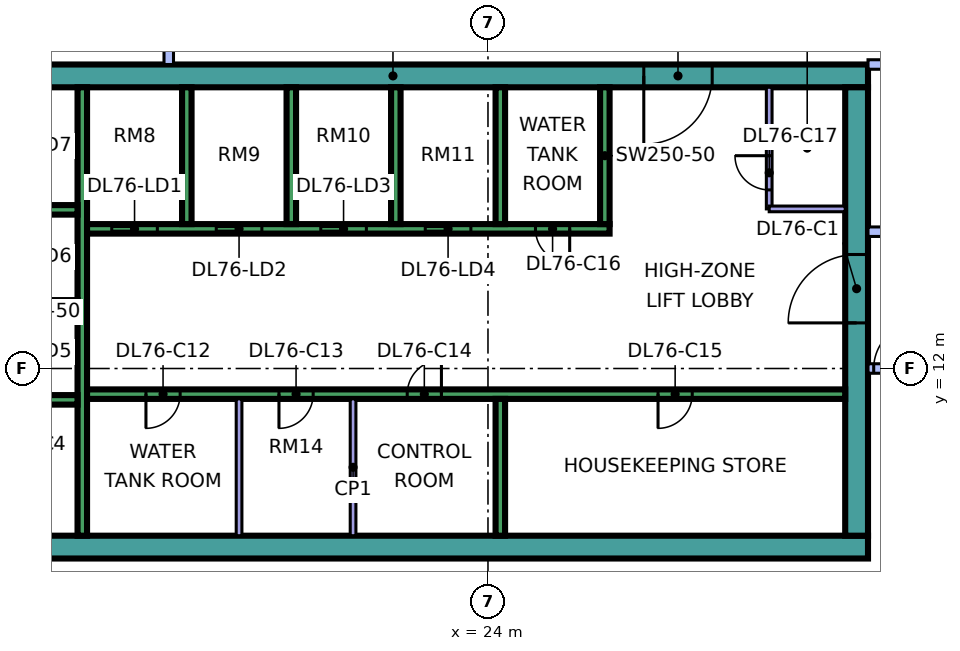
"""IFC4 building model, lengths in metres.
Left out: names, types, materials, properties, quantities, classifications, styles, units other than length and angle.
Written with IfcOpenShell. Run it as: python <this file> out.ifc"""

import sys

from ifc_helpers import new_model, si_unit, direction, frame, frame_2d, origin, place, context, subcontext, project, spatial, rectangle, extrude, element, fill, save


model = new_model("IFC4")
c1 = context("Model", 3, precision=1e-05, world=origin(), true_north=direction((0.0, 1.0)))
c2 = subcontext(c1, "Body", "Model", "MODEL_VIEW")
j1 = project(units=[si_unit("LENGTHUNIT", "METRE"), si_unit("PLANEANGLEUNIT", "RADIAN")], contexts=[c1])
p1 = place(None, origin())
s1 = spatial("IfcSite", under=j1, at=p1, CompositionType="ELEMENT")
p2 = place(p1, origin())
s2 = spatial("IfcBuilding", under=s1, at=p2, CompositionType="ELEMENT")
p3 = place(p2, frame((0.0, 0.0, 322.15)))
s3 = spatial("IfcBuildingStorey", under=s2, at=p3, CompositionType="ELEMENT", Elevation=322.15)
p4 = place(p3, frame((9.0, 7.3, 0.0), z_axis=(0.0, 0.0, 1.0), x_axis=(1.0, 0.0, 0.0)))
e1 = element("IfcWall", 1, at=p4, inside=s3, PredefinedType="SHEAR", context=c2, shape_type="SweptSolid", body=[
    extrude(rectangle(XDim=25.0, YDim=0.6, at=frame_2d((12.5, 0.0))), origin(), (0.0, 0.0, 1.0), 5.5),
])
p5 = place(p3, frame((9.0, 19.7, 0.0), z_axis=(0.0, 0.0, 1.0), x_axis=(1.0, 0.0, 0.0)))
e2 = element("IfcWall", 2, at=p5, inside=s3, PredefinedType="SHEAR", context=c2, shape_type="SweptSolid", body=[
    extrude(rectangle(XDim=25.0, YDim=0.6, at=frame_2d((12.5, 0.0))), origin(), (0.0, 0.0, 1.0), 5.5),
])
p6 = place(p5, frame((19.1, 0.0, 0.0)))
e3 = element("IfcOpeningElement", 3, at=p6, cuts=e2, PredefinedType="OPENING", context=c2, shape_type="SweptSolid", body=[
    extrude(rectangle(XDim=1.8, YDim=2.4, at=frame_2d((0.9, 1.2))), frame((0.0, 0.31, 0.0), z_axis=(0.0, -1.0, 0.0), x_axis=(1.0, 0.0, 0.0)), (0.0, 0.0, 1.0), 0.62),
])
p7 = place(p3, frame((33.7, 7.6, 0.0), z_axis=(0.0, 0.0, 1.0), x_axis=(0.0, 1.0, 0.0)))
e4 = element("IfcWall", 4, at=p7, inside=s3, PredefinedType="SHEAR", context=c2, shape_type="SweptSolid", body=[
    extrude(rectangle(XDim=11.8, YDim=0.6, at=frame_2d((5.9, 0.0))), origin(), (0.0, 0.0, 1.0), 5.5),
])
p8 = place(p7, frame((5.6, 0.0, 0.0)))
e5 = element("IfcOpeningElement", 5, at=p8, cuts=e4, PredefinedType="OPENING", context=c2, shape_type="SweptSolid", body=[
    extrude(rectangle(XDim=1.8, YDim=2.4, at=frame_2d((0.9, 1.2))), frame((0.0, 0.31, 0.0), z_axis=(0.0, -1.0, 0.0), x_axis=(1.0, 0.0, 0.0)), (0.0, 0.0, 1.0), 0.62),
])
p9 = place(p3, frame((13.325, 7.6, 0.0), z_axis=(0.0, 0.0, 1.0), x_axis=(0.0, 1.0, 0.0)))
e6 = element("IfcWall", 6, at=p9, inside=s3, PredefinedType="SHEAR", context=c2, shape_type="SweptSolid", body=[
    extrude(rectangle(XDim=11.8, YDim=0.25, at=frame_2d((5.9, 0.0))), origin(), (0.0, 0.0, 1.0), 5.5),
])
p10 = place(p3, frame((13.45, 11.325, 0.0), z_axis=(0.0, 0.0, 1.0), x_axis=(1.0, 0.0, 0.0)))
e7 = element("IfcWall", 7, at=p10, inside=s3, PredefinedType="SHEAR", context=c2, shape_type="SweptSolid", body=[
    extrude(rectangle(XDim=19.95, YDim=0.25, at=frame_2d((9.975, 0.0))), origin(), (0.0, 0.0, 1.0), 5.5),
])
p11 = place(p10, frame((1.55, 0.0, 0.0)))
e8 = element("IfcOpeningElement", 8, at=p11, cuts=e7, PredefinedType="OPENING", context=c2, shape_type="SweptSolid", body=[
    extrude(rectangle(XDim=0.9, YDim=2.1, at=frame_2d((0.45, 1.05))), frame((0.0, 0.135, 0.0), z_axis=(0.0, -1.0, 0.0), x_axis=(1.0, 0.0, 0.0)), (0.0, 0.0, 1.0), 0.27),
])
p12 = place(p10, frame((5.05, 0.0, 0.0)))
e9 = element("IfcOpeningElement", 9, at=p12, cuts=e7, PredefinedType="OPENING", context=c2, shape_type="SweptSolid", body=[
    extrude(rectangle(XDim=0.9, YDim=2.1, at=frame_2d((0.45, 1.05))), frame((0.0, 0.135, 0.0), z_axis=(0.0, -1.0, 0.0), x_axis=(1.0, 0.0, 0.0)), (0.0, 0.0, 1.0), 0.27),
])
p13 = place(p10, frame((8.425, 0.0, 0.0)))
e10 = element("IfcOpeningElement", 10, at=p13, cuts=e7, PredefinedType="OPENING", context=c2, shape_type="SweptSolid", body=[
    extrude(rectangle(XDim=0.9, YDim=2.1, at=frame_2d((0.45, 1.05))), frame((0.0, 0.135, 0.0), z_axis=(0.0, -1.0, 0.0), x_axis=(1.0, 0.0, 0.0)), (0.0, 0.0, 1.0), 0.27),
])
p14 = place(p10, frame((15.025, 0.0, 0.0)))
e11 = element("IfcOpeningElement", 11, at=p14, cuts=e7, PredefinedType="OPENING", context=c2, shape_type="SweptSolid", body=[
    extrude(rectangle(XDim=0.9, YDim=2.1, at=frame_2d((0.45, 1.05))), frame((0.0, 0.135, 0.0), z_axis=(0.0, -1.0, 0.0), x_axis=(1.0, 0.0, 0.0)), (0.0, 0.0, 1.0), 0.27),
])
p15 = place(p3, frame((13.45, 15.675, 0.0), z_axis=(0.0, 0.0, 1.0), x_axis=(1.0, 0.0, 0.0)))
e12 = element("IfcWall", 12, at=p15, inside=s3, PredefinedType="SHEAR", context=c2, shape_type="SweptSolid", body=[
    extrude(rectangle(XDim=13.75, YDim=0.25, at=frame_2d((6.875, 0.0))), origin(), (0.0, 0.0, 1.0), 5.5),
])
p16 = place(p15, frame((0.65, 0.0, 0.0)))
e13 = element("IfcOpeningElement", 13, at=p16, cuts=e12, PredefinedType="OPENING", context=c2, shape_type="SweptSolid", body=[
    extrude(rectangle(XDim=1.2, YDim=2.2, at=frame_2d((0.6, 1.1))), frame((0.0, 0.135, 0.0), z_axis=(0.0, -1.0, 0.0), x_axis=(1.0, 0.0, 0.0)), (0.0, 0.0, 1.0), 0.27),
])
p17 = place(p15, frame((3.4, 0.0, 0.0)))
e14 = element("IfcOpeningElement", 14, at=p17, cuts=e12, PredefinedType="OPENING", context=c2, shape_type="SweptSolid", body=[
    extrude(rectangle(XDim=1.2, YDim=2.2, at=frame_2d((0.6, 1.1))), frame((0.0, 0.135, 0.0), z_axis=(0.0, -1.0, 0.0), x_axis=(1.0, 0.0, 0.0)), (0.0, 0.0, 1.0), 0.27),
])
p18 = place(p15, frame((6.15, 0.0, 0.0)))
e15 = element("IfcOpeningElement", 15, at=p18, cuts=e12, PredefinedType="OPENING", context=c2, shape_type="SweptSolid", body=[
    extrude(rectangle(XDim=1.2, YDim=2.2, at=frame_2d((0.6, 1.1))), frame((0.0, 0.135, 0.0), z_axis=(0.0, -1.0, 0.0), x_axis=(1.0, 0.0, 0.0)), (0.0, 0.0, 1.0), 0.27),
])
p19 = place(p15, frame((8.9, 0.0, 0.0)))
e16 = element("IfcOpeningElement", 16, at=p19, cuts=e12, PredefinedType="OPENING", context=c2, shape_type="SweptSolid", body=[
    extrude(rectangle(XDim=1.2, YDim=2.2, at=frame_2d((0.6, 1.1))), frame((0.0, 0.135, 0.0), z_axis=(0.0, -1.0, 0.0), x_axis=(1.0, 0.0, 0.0)), (0.0, 0.0, 1.0), 0.27),
])
p20 = place(p15, frame((11.8, 0.0, 0.0)))
e17 = element("IfcOpeningElement", 17, at=p20, cuts=e12, PredefinedType="OPENING", context=c2, shape_type="SweptSolid", body=[
    extrude(rectangle(XDim=0.9, YDim=2.1, at=frame_2d((0.45, 1.05))), frame((0.0, 0.135, 0.0), z_axis=(0.0, -1.0, 0.0), x_axis=(1.0, 0.0, 0.0)), (0.0, 0.0, 1.0), 0.27),
])
for number, where, z_axis, x_axis in (
    (18, (10.2, 11.175, 0.0), (0.0, 0.0, 1.0), (1.0, 0.0, 0.0)),
    (19, (10.2, 13.675, 0.0), (0.0, 0.0, 1.0), (1.0, 0.0, 0.0)),
    (20, (10.2, 16.175, 0.0), (0.0, 0.0, 1.0), (1.0, 0.0, 0.0)),
):
    element("IfcWall", number, at=place(p3, frame(where, z_axis=z_axis, x_axis=x_axis)), inside=s3, PredefinedType="SHEAR", context=c2, shape_type="SweptSolid", body=[
        extrude(rectangle(XDim=3.0, YDim=0.25, at=frame_2d((1.5, 0.0))), origin(), (0.0, 0.0, 1.0), 5.5),
    ])
for number, where, z_axis, x_axis in (
    (21, (24.325, 7.6, 0.0), (0.0, 0.0, 1.0), (0.0, 1.0, 0.0)),
    (22, (16.075, 15.8, 0.0), (0.0, 0.0, 1.0), (0.0, 1.0, 0.0)),
    (23, (18.825, 15.8, 0.0), (0.0, 0.0, 1.0), (0.0, 1.0, 0.0)),
    (24, (21.575, 15.8, 0.0), (0.0, 0.0, 1.0), (0.0, 1.0, 0.0)),
    (25, (24.325, 15.8, 0.0), (0.0, 0.0, 1.0), (0.0, 1.0, 0.0)),
    (26, (27.075, 15.8, 0.0), (0.0, 0.0, 1.0), (0.0, 1.0, 0.0)),
):
    element("IfcWall", number, at=place(p3, frame(where, z_axis=z_axis, x_axis=x_axis)), inside=s3, PredefinedType="SHEAR", context=c2, shape_type="SweptSolid", body=[
        extrude(rectangle(XDim=3.6, YDim=0.25, at=frame_2d((1.8, 0.0))), origin(), (0.0, 0.0, 1.0), 5.5),
    ])
p21 = place(p3, frame((-1.447, 12.553, 0.0), z_axis=(0.0, 0.0, 1.0), x_axis=(0.707106781187, -0.707106781187, 0.0)))
e27 = element("IfcWall", 27, at=p21, inside=s3, PredefinedType="SOLIDWALL", context=c2, shape_type="SweptSolid", body=[
    extrude(rectangle(XDim=19.799, YDim=0.15, at=frame_2d((9.899, 0.0))), origin(), (0.0, 0.0, 1.0), 5.05),
])
p22 = place(p21, frame((11.453, 0.0, 0.45)))
e28 = element("IfcOpeningElement", 28, at=p22, cuts=e27, PredefinedType="OPENING", context=c2, shape_type="SweptSolid", body=[
    extrude(rectangle(XDim=3.0, YDim=3.6, at=frame_2d((1.5, 1.8))), frame((0.0, 0.085, 0.0), z_axis=(0.0, -1.0, 0.0), x_axis=(1.0, 0.0, 0.0)), (0.0, 0.0, 1.0), 0.17),
])
for number, where, z_axis, x_axis in (
    (29, (17.45, 7.6, 0.0), (0.0, 0.0, 1.0), (0.0, 1.0, 0.0)),
    (30, (20.45, 7.6, 0.0), (0.0, 0.0, 1.0), (0.0, 1.0, 0.0)),
):
    element("IfcWall", number, at=place(p3, frame(where, z_axis=z_axis, x_axis=x_axis)), inside=s3, PredefinedType="PARTITIONING", context=c2, shape_type="SweptSolid", body=[
        extrude(rectangle(XDim=3.6, YDim=0.15, at=frame_2d((1.8, 0.0))), origin(), (0.0, 0.0, 1.0), 5.05),
    ])
p23 = place(p3, frame((31.4, 16.2, 0.0), z_axis=(0.0, 0.0, 1.0), x_axis=(0.0, 1.0, 0.0)))
e31 = element("IfcWall", 31, at=p23, inside=s3, PredefinedType="PARTITIONING", context=c2, shape_type="SweptSolid", body=[
    extrude(rectangle(XDim=3.2, YDim=0.15, at=frame_2d((1.6, 0.0))), origin(), (0.0, 0.0, 1.0), 5.05),
])
p24 = place(p23, frame((0.5, 0.0, 0.0)))
e32 = element("IfcOpeningElement", 32, at=p24, cuts=e31, PredefinedType="OPENING", context=c2, shape_type="SweptSolid", body=[
    extrude(rectangle(XDim=0.9, YDim=2.1, at=frame_2d((0.45, 1.05))), frame((0.0, 0.085, 0.0), z_axis=(0.0, -1.0, 0.0), x_axis=(1.0, 0.0, 0.0)), (0.0, 0.0, 1.0), 0.17),
])
p25 = place(p3, frame((31.4, 16.2, 0.0), z_axis=(0.0, 0.0, 1.0), x_axis=(1.0, 0.0, 0.0)))
e33 = element("IfcWall", 33, at=p25, inside=s3, PredefinedType="PARTITIONING", context=c2, shape_type="SweptSolid", body=[
    extrude(rectangle(XDim=2.0, YDim=0.15, at=frame_2d((1.0, 0.0))), origin(), (0.0, 0.0, 1.0), 5.05),
])
p26 = place(p3, frame((15.6, 20.0, 0.0), z_axis=(0.0, 0.0, 1.0), x_axis=(0.0, 1.0, 0.0)))
e34 = element("IfcWall", 34, at=p26, inside=s3, PredefinedType="PARTITIONING", context=c2, shape_type="SweptSolid", body=[
    extrude(rectangle(XDim=27.775, YDim=0.25, at=frame_2d((13.887, 0.0))), origin(), (0.0, 0.0, 1.0), 5.05),
])
p27 = place(p26, frame((18.15, 0.0, 0.0)))
e35 = element("IfcOpeningElement", 35, at=p27, cuts=e34, PredefinedType="OPENING", context=c2, shape_type="SweptSolid", body=[
    extrude(rectangle(XDim=1.8, YDim=2.1, at=frame_2d((0.9, 1.05))), frame((0.0, 0.135, 0.0), z_axis=(0.0, -1.0, 0.0), x_axis=(1.0, 0.0, 0.0)), (0.0, 0.0, 1.0), 0.27),
])
p28 = place(p26, frame((24.4, 0.0, 0.0)))
e36 = element("IfcOpeningElement", 36, at=p28, cuts=e34, PredefinedType="OPENING", context=c2, shape_type="SweptSolid", body=[
    extrude(rectangle(XDim=0.9, YDim=2.1, at=frame_2d((0.45, 1.05))), frame((0.0, 0.135, 0.0), z_axis=(0.0, -1.0, 0.0), x_axis=(1.0, 0.0, 0.0)), (0.0, 0.0, 1.0), 0.27),
])
p29 = place(p26, frame((14.65, 0.0, 0.0)))
e37 = element("IfcOpeningElement", 37, at=p29, cuts=e34, PredefinedType="OPENING", context=c2, shape_type="SweptSolid", body=[
    extrude(rectangle(XDim=0.9, YDim=2.1, at=frame_2d((0.45, 1.05))), frame((0.0, 0.135, 0.0), z_axis=(0.0, -1.0, 0.0), x_axis=(1.0, 0.0, 0.0)), (0.0, 0.0, 1.0), 0.27),
])
p30 = place(p26, frame((11.4, 0.0, 0.0)))
e38 = element("IfcOpeningElement", 38, at=p30, cuts=e34, PredefinedType="OPENING", context=c2, shape_type="SweptSolid", body=[
    extrude(rectangle(XDim=0.9, YDim=2.1, at=frame_2d((0.45, 1.05))), frame((0.0, 0.135, 0.0), z_axis=(0.0, -1.0, 0.0), x_axis=(1.0, 0.0, 0.0)), (0.0, 0.0, 1.0), 0.27),
])
p31 = place(p3, frame((34.0, 12.0, 0.0), z_axis=(0.0, 0.0, 1.0), x_axis=(1.0, 0.0, 0.0)))
e39 = element("IfcWall", 39, at=p31, inside=s3, PredefinedType="PARTITIONING", context=c2, shape_type="SweptSolid", body=[
    extrude(rectangle(XDim=3.2, YDim=0.25, at=frame_2d((1.6, 0.0))), origin(), (0.0, 0.0, 1.0), 5.05),
])
p32 = place(p31, frame((0.15, 0.0, 0.0)))
e40 = element("IfcOpeningElement", 40, at=p32, cuts=e39, PredefinedType="OPENING", context=c2, shape_type="SweptSolid", body=[
    extrude(rectangle(XDim=1.2, YDim=2.1, at=frame_2d((0.6, 1.05))), frame((0.0, 0.135, 0.0), z_axis=(0.0, -1.0, 0.0), x_axis=(1.0, 0.0, 0.0)), (0.0, 0.0, 1.0), 0.27),
])
p33 = place(p3, frame((34.0, 15.6, 0.0), z_axis=(0.0, 0.0, 1.0), x_axis=(1.0, 0.0, 0.0)))
e41 = element("IfcWall", 41, at=p33, inside=s3, PredefinedType="PARTITIONING", context=c2, shape_type="SweptSolid", body=[
    extrude(rectangle(XDim=10.35, YDim=0.25, at=frame_2d((5.175, 0.0))), origin(), (0.0, 0.0, 1.0), 5.05),
])
p34 = place(p33, frame((2.25, 0.0, 0.0)))
e42 = element("IfcOpeningElement", 42, at=p34, cuts=e41, PredefinedType="OPENING", context=c2, shape_type="SweptSolid", body=[
    extrude(rectangle(XDim=1.8, YDim=2.1, at=frame_2d((0.9, 1.05))), frame((0.0, 0.135, 0.0), z_axis=(0.0, -1.0, 0.0), x_axis=(1.0, 0.0, 0.0)), (0.0, 0.0, 1.0), 0.27),
])
p35 = place(p33, frame((7.8, 0.0, 0.0)))
e43 = element("IfcOpeningElement", 43, at=p35, cuts=e41, PredefinedType="OPENING", context=c2, shape_type="SweptSolid", body=[
    extrude(rectangle(XDim=0.9, YDim=2.1, at=frame_2d((0.45, 1.05))), frame((0.0, 0.135, 0.0), z_axis=(0.0, -1.0, 0.0), x_axis=(1.0, 0.0, 0.0)), (0.0, 0.0, 1.0), 0.27),
])
p36 = place(p3, frame((34.0, 20.0, 0.0), z_axis=(0.0, 0.0, 1.0), x_axis=(1.0, 0.0, 0.0)))
e44 = element("IfcWall", 44, at=p36, inside=s3, PredefinedType="PARTITIONING", context=c2, shape_type="SweptSolid", body=[
    extrude(rectangle(XDim=1.875, YDim=0.25, at=frame_2d((0.938, 0.0))), origin(), (0.0, 0.0, 1.0), 5.05),
])
p37 = place(p16, origin())
e45 = element("IfcDoor", 45, at=p37, inside=s3, OperationType="DOUBLE_DOOR_SLIDING", PredefinedType="DOOR", context=c2, shape_type="SweptSolid", body=[
    extrude(rectangle(XDim=1.2, YDim=2.2, at=frame_2d((0.6, 1.1))), frame((0.0, 0.025, 0.0), z_axis=(0.0, -1.0, 0.0), x_axis=(1.0, 0.0, 0.0)), (0.0, 0.0, 1.0), 0.05),
])
fill(e13, e45)
p38 = place(p17, origin())
e46 = element("IfcDoor", 46, at=p38, inside=s3, OperationType="DOUBLE_DOOR_SLIDING", PredefinedType="DOOR", context=c2, shape_type="SweptSolid", body=[
    extrude(rectangle(XDim=1.2, YDim=2.2, at=frame_2d((0.6, 1.1))), frame((0.0, 0.025, 0.0), z_axis=(0.0, -1.0, 0.0), x_axis=(1.0, 0.0, 0.0)), (0.0, 0.0, 1.0), 0.05),
])
fill(e14, e46)
p39 = place(p18, origin())
e47 = element("IfcDoor", 47, at=p39, inside=s3, OperationType="DOUBLE_DOOR_SLIDING", PredefinedType="DOOR", context=c2, shape_type="SweptSolid", body=[
    extrude(rectangle(XDim=1.2, YDim=2.2, at=frame_2d((0.6, 1.1))), frame((0.0, 0.025, 0.0), z_axis=(0.0, -1.0, 0.0), x_axis=(1.0, 0.0, 0.0)), (0.0, 0.0, 1.0), 0.05),
])
fill(e15, e47)
p40 = place(p19, origin())
e48 = element("IfcDoor", 48, at=p40, inside=s3, OperationType="DOUBLE_DOOR_SLIDING", PredefinedType="DOOR", context=c2, shape_type="SweptSolid", body=[
    extrude(rectangle(XDim=1.2, YDim=2.2, at=frame_2d((0.6, 1.1))), frame((0.0, 0.025, 0.0), z_axis=(0.0, -1.0, 0.0), x_axis=(1.0, 0.0, 0.0)), (0.0, 0.0, 1.0), 0.05),
])
fill(e16, e48)
p41 = place(p8, origin())
e49 = element("IfcDoor", 49, at=p41, inside=s3, OperationType="DOUBLE_DOOR_SINGLE_SWING", PredefinedType="DOOR", context=c2, shape_type="SweptSolid", body=[
    extrude(rectangle(XDim=1.8, YDim=2.4, at=frame_2d((0.9, 1.2))), frame((0.0, 0.025, 0.0), z_axis=(0.0, -1.0, 0.0), x_axis=(1.0, 0.0, 0.0)), (0.0, 0.0, 1.0), 0.05),
])
fill(e5, e49)
p42 = place(p6, frame((1.8, 0.0, 0.0), z_axis=(0.0, 0.0, 1.0), x_axis=(-1.0, 0.0, 0.0)))
e50 = element("IfcDoor", 50, at=p42, inside=s3, OperationType="DOUBLE_DOOR_SINGLE_SWING", PredefinedType="DOOR", context=c2, shape_type="SweptSolid", body=[
    extrude(rectangle(XDim=1.8, YDim=2.4, at=frame_2d((0.9, 1.2))), frame((0.0, 0.025, 0.0), z_axis=(0.0, -1.0, 0.0), x_axis=(1.0, 0.0, 0.0)), (0.0, 0.0, 1.0), 0.05),
])
fill(e3, e50)
p43 = place(p11, frame((0.9, 0.0, 0.0), z_axis=(0.0, 0.0, 1.0), x_axis=(-1.0, 0.0, 0.0)))
e51 = element("IfcDoor", 51, at=p43, inside=s3, OperationType="SINGLE_SWING_LEFT", PredefinedType="DOOR", context=c2, shape_type="SweptSolid", body=[
    extrude(rectangle(XDim=0.9, YDim=2.1, at=frame_2d((0.45, 1.05))), frame((0.0, 0.025, 0.0), z_axis=(0.0, -1.0, 0.0), x_axis=(1.0, 0.0, 0.0)), (0.0, 0.0, 1.0), 0.05),
])
fill(e8, e51)
p44 = place(p12, frame((0.9, 0.0, 0.0), z_axis=(0.0, 0.0, 1.0), x_axis=(-1.0, 0.0, 0.0)))
e52 = element("IfcDoor", 52, at=p44, inside=s3, OperationType="SINGLE_SWING_LEFT", PredefinedType="DOOR", context=c2, shape_type="SweptSolid", body=[
    extrude(rectangle(XDim=0.9, YDim=2.1, at=frame_2d((0.45, 1.05))), frame((0.0, 0.025, 0.0), z_axis=(0.0, -1.0, 0.0), x_axis=(1.0, 0.0, 0.0)), (0.0, 0.0, 1.0), 0.05),
])
fill(e9, e52)
p45 = place(p13, frame((0.9, 0.0, 0.0), z_axis=(0.0, 0.0, 1.0), x_axis=(-1.0, 0.0, 0.0)))
e53 = element("IfcDoor", 53, at=p45, inside=s3, OperationType="SINGLE_SWING_RIGHT", PredefinedType="DOOR", context=c2, shape_type="SweptSolid", body=[
    extrude(rectangle(XDim=0.9, YDim=2.1, at=frame_2d((0.45, 1.05))), frame((0.0, 0.025, 0.0), z_axis=(0.0, -1.0, 0.0), x_axis=(1.0, 0.0, 0.0)), (0.0, 0.0, 1.0), 0.05),
])
fill(e10, e53)
p46 = place(p14, frame((0.9, 0.0, 0.0), z_axis=(0.0, 0.0, 1.0), x_axis=(-1.0, 0.0, 0.0)))
e54 = element("IfcDoor", 54, at=p46, inside=s3, OperationType="SINGLE_SWING_LEFT", PredefinedType="DOOR", context=c2, shape_type="SweptSolid", body=[
    extrude(rectangle(XDim=0.9, YDim=2.1, at=frame_2d((0.45, 1.05))), frame((0.0, 0.025, 0.0), z_axis=(0.0, -1.0, 0.0), x_axis=(1.0, 0.0, 0.0)), (0.0, 0.0, 1.0), 0.05),
])
fill(e11, e54)
p47 = place(p20, origin())
e55 = element("IfcDoor", 55, at=p47, inside=s3, OperationType="SINGLE_SWING_RIGHT", PredefinedType="DOOR", context=c2, shape_type="SweptSolid", body=[
    extrude(rectangle(XDim=0.9, YDim=2.1, at=frame_2d((0.45, 1.05))), frame((0.0, 0.025, 0.0), z_axis=(0.0, -1.0, 0.0), x_axis=(1.0, 0.0, 0.0)), (0.0, 0.0, 1.0), 0.05),
])
fill(e17, e55)
p48 = place(p24, frame((0.9, 0.0, 0.0), z_axis=(0.0, 0.0, 1.0), x_axis=(-1.0, 0.0, 0.0)))
e56 = element("IfcDoor", 56, at=p48, inside=s3, OperationType="SINGLE_SWING_RIGHT", PredefinedType="DOOR", context=c2, shape_type="SweptSolid", body=[
    extrude(rectangle(XDim=0.9, YDim=2.1, at=frame_2d((0.45, 1.05))), frame((0.0, 0.025, 0.0), z_axis=(0.0, -1.0, 0.0), x_axis=(1.0, 0.0, 0.0)), (0.0, 0.0, 1.0), 0.05),
])
fill(e32, e56)
p49 = place(p32, frame((1.2, 0.0, 0.0), z_axis=(0.0, 0.0, 1.0), x_axis=(-1.0, 0.0, 0.0)))
e57 = element("IfcDoor", 57, at=p49, inside=s3, OperationType="SINGLE_SWING_RIGHT", PredefinedType="DOOR", context=c2, shape_type="SweptSolid", body=[
    extrude(rectangle(XDim=1.2, YDim=2.1, at=frame_2d((0.6, 1.05))), frame((0.0, 0.025, 0.0), z_axis=(0.0, -1.0, 0.0), x_axis=(1.0, 0.0, 0.0)), (0.0, 0.0, 1.0), 0.05),
])
fill(e40, e57)
save(model, sys.argv[1])
